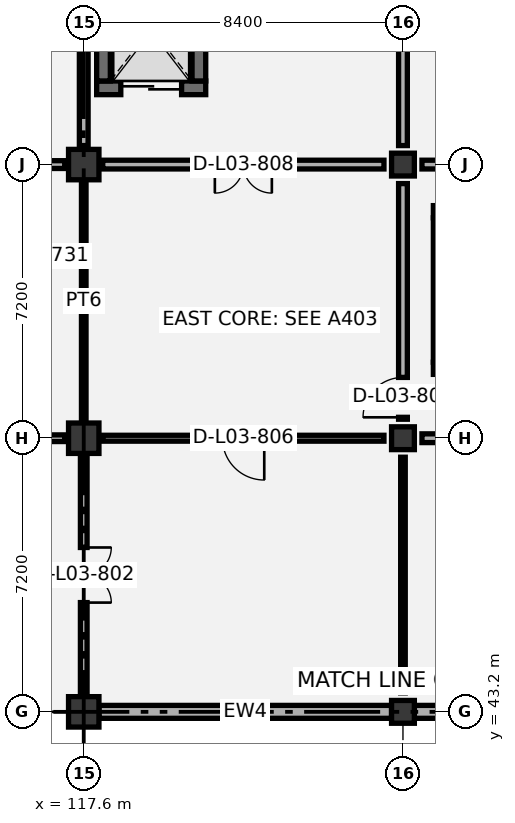
"""IFC4 building model, lengths in metres.
Left out: names, types, materials, properties, quantities, classifications, styles, units other than length and angle.
Written with IfcOpenShell. Run it as: python <this file> out.ifc"""

import sys

from ifc_helpers import new_model, si_unit, direction, frame, frame_2d, origin, origin_2d, place, context, subcontext, project, spatial, rectangle, extrude, element, fill, save


model = new_model("IFC4")
c1 = context("Model", 3, precision=1e-05, world=origin(), true_north=direction((0.0, 1.0)))
c2 = subcontext(c1, "Body", "Model", "MODEL_VIEW")
j1 = project(units=[si_unit("LENGTHUNIT", "METRE"), si_unit("PLANEANGLEUNIT", "RADIAN")], contexts=[c1])
p1 = place(None, origin())
s1 = spatial("IfcSite", under=j1, at=p1, CompositionType="ELEMENT")
p2 = place(p1, origin())
s2 = spatial("IfcBuilding", under=s1, at=p2, CompositionType="ELEMENT")
p3 = place(p2, frame((0.0, 0.0, 16.8)))
s3 = spatial("IfcBuildingStorey", under=s2, at=p3, CompositionType="ELEMENT", Elevation=16.8)
for number, where, z_axis, x_axis in (
    (1, (117.6, 43.2, 0.0), (0.0, 0.0, 1.0), (1.0, 0.0, 0.0)),
    (2, (117.6, 50.4, 0.0), (0.0, 0.0, 1.0), (1.0, 0.0, 0.0)),
    (3, (117.6, 57.6, 0.0), (0.0, 0.0, 1.0), (1.0, 0.0, 0.0)),
):
    element("IfcColumn", number, at=place(p3, frame(where, z_axis=z_axis, x_axis=x_axis)), inside=s3, PredefinedType="COLUMN", context=c2, shape_type="SweptSolid", body=[
        extrude(rectangle(XDim=0.8, YDim=0.8, at=origin_2d()), origin(), (0.0, 0.0, 1.0), 5.4),
    ])
for number, where, z_axis, x_axis in (
    (4, (126.0, 43.2, 0.0), (0.0, 0.0, 1.0), (1.0, 0.0, 0.0)),
    (5, (126.0, 50.4, 0.0), (0.0, 0.0, 1.0), (1.0, 0.0, 0.0)),
    (6, (126.0, 57.6, 0.0), (0.0, 0.0, 1.0), (1.0, 0.0, 0.0)),
):
    element("IfcColumn", number, at=place(p3, frame(where, z_axis=z_axis, x_axis=x_axis)), inside=s3, PredefinedType="COLUMN", context=c2, shape_type="SweptSolid", body=[
        extrude(rectangle(XDim=0.6, YDim=0.6, at=origin_2d()), origin(), (0.0, 0.0, 1.0), 5.4),
    ])
p4 = place(p3, frame((126.8, 52.24, 0.0), z_axis=(0.0, 0.0, 1.0), x_axis=(1.0, 0.0, 0.0)))
e7 = element("IfcWall", 7, at=p4, inside=s3, PredefinedType="SHEAR", context=c2, shape_type="SweptSolid", body=[
    extrude(rectangle(XDim=7.48, YDim=0.32, at=frame_2d((3.74, 0.0))), origin(), (0.0, 0.0, 1.0), 5.05),
])
p5 = place(p4, frame((0.45, 0.0, 0.0)))
e8 = element("IfcOpeningElement", 8, at=p5, cuts=e7, PredefinedType="OPENING", context=c2, shape_type="SweptSolid", body=[
    extrude(rectangle(XDim=1.05, YDim=2.15, at=frame_2d((0.525, 1.075))), frame((0.0, 0.17, 0.0), z_axis=(0.0, -1.0, 0.0), x_axis=(1.0, 0.0, 0.0)), (0.0, 0.0, 1.0), 0.34),
])
p6 = place(p3, frame((126.8, 56.36, 0.0), z_axis=(0.0, 0.0, 1.0), x_axis=(1.0, 0.0, 0.0)))
e9 = element("IfcWall", 9, at=p6, inside=s3, PredefinedType="SHEAR", context=c2, shape_type="SweptSolid", body=[
    extrude(rectangle(XDim=7.48, YDim=0.32, at=frame_2d((3.74, 0.0))), origin(), (0.0, 0.0, 1.0), 5.05),
])
p7 = place(p3, frame((126.96, 52.4, 0.0), z_axis=(0.0, 0.0, 1.0), x_axis=(0.0, 1.0, 0.0)))
e10 = element("IfcWall", 10, at=p7, inside=s3, PredefinedType="SHEAR", context=c2, shape_type="SweptSolid", body=[
    extrude(rectangle(XDim=3.8, YDim=0.32, at=frame_2d((1.9, 0.0))), origin(), (0.0, 0.0, 1.0), 5.05),
])
p8 = place(p3, frame((117.94, 59.62, 0.0), z_axis=(0.0, 0.0, 1.0), x_axis=(1.0, 0.0, 0.0)))
e11 = element("IfcWall", 11, at=p8, inside=s3, PredefinedType="SHEAR", context=c2, shape_type="SweptSolid", body=[
    extrude(rectangle(XDim=2.87, YDim=0.36, at=frame_2d((1.435, 0.0))), origin(), (0.0, 0.0, 1.0), 6.5),
])
p9 = place(p8, frame((0.635, 0.0, 0.0)))
e12 = element("IfcOpeningElement", 12, at=p9, cuts=e11, PredefinedType="OPENING", context=c2, shape_type="SweptSolid", body=[
    extrude(rectangle(XDim=1.6, YDim=2.25, at=frame_2d((0.8, 1.125))), frame((0.0, 0.19, 0.0), z_axis=(0.0, -1.0, 0.0), x_axis=(1.0, 0.0, 0.0)), (0.0, 0.0, 1.0), 0.38),
])
for number, where, z_axis, x_axis in (
    (13, (118.12, 59.8, 0.0), (0.0, 0.0, 1.0), (0.0, 1.0, 0.0)),
    (14, (120.63, 59.8, 0.0), (0.0, 0.0, 1.0), (0.0, 1.0, 0.0)),
):
    element("IfcWall", number, at=place(p3, frame(where, z_axis=z_axis, x_axis=x_axis)), inside=s3, PredefinedType="SHEAR", context=c2, shape_type="SweptSolid", body=[
        extrude(rectangle(XDim=2.8, YDim=0.36, at=frame_2d((1.4, 0.0))), origin(), (0.0, 0.0, 1.0), 6.5),
    ])
p10 = place(p3, frame((118.0, 43.2, 0.0), z_axis=(0.0, 0.0, 1.0), x_axis=(1.0, 0.0, 0.0)))
e15 = element("IfcWall", 15, at=p10, inside=s3, PredefinedType="SOLIDWALL", context=c2, shape_type="SweptSolid", body=[
    extrude(rectangle(XDim=7.7, YDim=0.34, at=frame_2d((3.85, 0.0))), origin(), (0.0, 0.0, 1.0), 4.395),
])
p11 = place(p3, frame((126.3, 43.2, 0.0), z_axis=(0.0, 0.0, 1.0), x_axis=(1.0, 0.0, 0.0)))
e16 = element("IfcWall", 16, at=p11, inside=s3, PredefinedType="SOLIDWALL", context=c2, shape_type="SweptSolid", body=[
    extrude(rectangle(XDim=7.8, YDim=0.34, at=frame_2d((3.9, 0.0))), origin(), (0.0, 0.0, 1.0), 4.395),
])
p12 = place(p3, frame((109.35, 55.2, 0.0), z_axis=(0.0, 0.0, 1.0), x_axis=(1.0, 0.0, 0.0)))
e17 = element("IfcWall", 17, at=p12, inside=s3, PredefinedType="PARTITIONING", context=c2, shape_type="SweptSolid", body=[
    extrude(rectangle(XDim=8.1, YDim=0.12, at=frame_2d((4.05, 0.0))), origin(), (0.0, 0.0, 1.0), 4.95),
])
p13 = place(p12, frame((1.08, 0.0, 0.0)))
e18 = element("IfcOpeningElement", 18, at=p13, cuts=e17, PredefinedType="OPENING", context=c2, shape_type="SweptSolid", body=[
    extrude(rectangle(XDim=0.95, YDim=2.1, at=frame_2d((0.475, 1.05))), frame((0.0, 0.07, 0.0), z_axis=(0.0, -1.0, 0.0), x_axis=(1.0, 0.0, 0.0)), (0.0, 0.0, 1.0), 0.14),
])
p14 = place(p12, frame((3.63, 0.0, 0.0)))
e19 = element("IfcOpeningElement", 19, at=p14, cuts=e17, PredefinedType="OPENING", context=c2, shape_type="SweptSolid", body=[
    extrude(rectangle(XDim=0.9, YDim=2.1, at=frame_2d((0.45, 1.05))), frame((0.0, 0.07, 0.0), z_axis=(0.0, -1.0, 0.0), x_axis=(1.0, 0.0, 0.0)), (0.0, 0.0, 1.0), 0.14),
])
p15 = place(p12, frame((6.13, 0.0, 0.0)))
e20 = element("IfcOpeningElement", 20, at=p15, cuts=e17, PredefinedType="OPENING", context=c2, shape_type="SweptSolid", body=[
    extrude(rectangle(XDim=1.0, YDim=2.1, at=frame_2d((0.5, 1.05))), frame((0.0, 0.07, 0.0), z_axis=(0.0, -1.0, 0.0), x_axis=(1.0, 0.0, 0.0)), (0.0, 0.0, 1.0), 0.14),
])
p16 = place(p3, frame((117.6, 43.7, 0.0), z_axis=(0.0, 0.0, 1.0), x_axis=(0.0, 1.0, 0.0)))
e21 = element("IfcWall", 21, at=p16, inside=s3, PredefinedType="PARTITIONING", context=c2, shape_type="SweptSolid", body=[
    extrude(rectangle(XDim=6.2, YDim=0.175, at=frame_2d((3.1, 0.0))), origin(), (0.0, 0.0, 1.0), 4.245),
])
p17 = place(p16, frame((2.375, 0.0, 0.0)))
e22 = element("IfcOpeningElement", 22, at=p17, cuts=e21, PredefinedType="OPENING", context=c2, shape_type="SweptSolid", body=[
    extrude(rectangle(XDim=1.45, YDim=2.2, at=frame_2d((0.725, 1.1))), frame((0.0, 0.097, 0.0), z_axis=(0.0, -1.0, 0.0), x_axis=(1.0, 0.0, 0.0)), (0.0, 0.0, 1.0), 0.195),
])
p18 = place(p3, frame((109.7, 50.4, 0.0), z_axis=(0.0, 0.0, 1.0), x_axis=(1.0, 0.0, 0.0)))
e23 = element("IfcWall", 23, at=p18, inside=s3, PredefinedType="PARTITIONING", context=c2, shape_type="SweptSolid", body=[
    extrude(rectangle(XDim=7.4, YDim=0.175, at=frame_2d((3.7, 0.0))), origin(), (0.0, 0.0, 1.0), 4.195),
])
p19 = place(p3, frame((117.6, 50.9, 0.0), z_axis=(0.0, 0.0, 1.0), x_axis=(0.0, 1.0, 0.0)))
e24 = element("IfcWall", 24, at=p19, inside=s3, PredefinedType="PARTITIONING", context=c2, shape_type="SweptSolid", body=[
    extrude(rectangle(XDim=6.2, YDim=0.12, at=frame_2d((3.1, 0.0))), origin(), (0.0, 0.0, 1.0), 4.545),
])
p20 = place(p3, frame((109.7, 57.6, 0.0), z_axis=(0.0, 0.0, 1.0), x_axis=(1.0, 0.0, 0.0)))
e25 = element("IfcWall", 25, at=p20, inside=s3, PredefinedType="PARTITIONING", context=c2, shape_type="SweptSolid", body=[
    extrude(rectangle(XDim=7.4, YDim=0.205, at=frame_2d((3.7, 0.0))), origin(), (0.0, 0.0, 1.0), 4.195),
])
p21 = place(p20, frame((3.025, 0.0, 0.0)))
e26 = element("IfcOpeningElement", 26, at=p21, cuts=e25, PredefinedType="OPENING", context=c2, shape_type="SweptSolid", body=[
    extrude(rectangle(XDim=1.35, YDim=2.15, at=frame_2d((0.675, 1.075))), frame((0.0, 0.113, 0.0), z_axis=(0.0, -1.0, 0.0), x_axis=(1.0, 0.0, 0.0)), (0.0, 0.0, 1.0), 0.225),
])
p22 = place(p3, frame((117.6, 58.1, 0.0), z_axis=(0.0, 0.0, 1.0), x_axis=(0.0, 1.0, 0.0)))
e27 = element("IfcWall", 27, at=p22, inside=s3, PredefinedType="PARTITIONING", context=c2, shape_type="SweptSolid", body=[
    extrude(rectangle(XDim=6.2, YDim=0.23, at=frame_2d((3.1, 0.0))), origin(), (0.0, 0.0, 1.0), 4.245),
])
p23 = place(p3, frame((126.0, 43.7, 0.0), z_axis=(0.0, 0.0, 1.0), x_axis=(0.0, 1.0, 0.0)))
e28 = element("IfcWall", 28, at=p23, inside=s3, PredefinedType="PARTITIONING", context=c2, shape_type="SweptSolid", body=[
    extrude(rectangle(XDim=6.2, YDim=0.12, at=frame_2d((3.1, 0.0))), origin(), (0.0, 0.0, 1.0), 4.645),
])
p24 = place(p3, frame((118.1, 50.4, 0.0), z_axis=(0.0, 0.0, 1.0), x_axis=(1.0, 0.0, 0.0)))
e29 = element("IfcWall", 29, at=p24, inside=s3, PredefinedType="PARTITIONING", context=c2, shape_type="SweptSolid", body=[
    extrude(rectangle(XDim=7.4, YDim=0.155, at=frame_2d((3.7, 0.0))), origin(), (0.0, 0.0, 1.0), 4.295),
])
p25 = place(p24, frame((3.15, 0.0, 0.0)))
e30 = element("IfcOpeningElement", 30, at=p25, cuts=e29, PredefinedType="OPENING", context=c2, shape_type="SweptSolid", body=[
    extrude(rectangle(XDim=1.1, YDim=2.1, at=frame_2d((0.55, 1.05))), frame((0.0, 0.087, 0.0), z_axis=(0.0, -1.0, 0.0), x_axis=(1.0, 0.0, 0.0)), (0.0, 0.0, 1.0), 0.175),
])
p26 = place(p3, frame((126.0, 50.9, 0.0), z_axis=(0.0, 0.0, 1.0), x_axis=(0.0, 1.0, 0.0)))
e31 = element("IfcWall", 31, at=p26, inside=s3, PredefinedType="PARTITIONING", context=c2, shape_type="SweptSolid", body=[
    extrude(rectangle(XDim=6.2, YDim=0.23, at=frame_2d((3.1, 0.0))), origin(), (0.0, 0.0, 1.0), 4.345),
])
p27 = place(p26, frame((0.05, 0.0, 0.0)))
e32 = element("IfcOpeningElement", 32, at=p27, cuts=e31, PredefinedType="OPENING", context=c2, shape_type="SweptSolid", body=[
    extrude(rectangle(XDim=1.05, YDim=2.15, at=frame_2d((0.525, 1.075))), frame((0.0, 0.125, 0.0), z_axis=(0.0, -1.0, 0.0), x_axis=(1.0, 0.0, 0.0)), (0.0, 0.0, 1.0), 0.25),
])
p28 = place(p3, frame((118.1, 57.6, 0.0), z_axis=(0.0, 0.0, 1.0), x_axis=(1.0, 0.0, 0.0)))
e33 = element("IfcWall", 33, at=p28, inside=s3, PredefinedType="PARTITIONING", context=c2, shape_type="SweptSolid", body=[
    extrude(rectangle(XDim=7.4, YDim=0.23, at=frame_2d((3.7, 0.0))), origin(), (0.0, 0.0, 1.0), 4.295),
])
p29 = place(p28, frame((2.95, 0.0, 0.0)))
e34 = element("IfcOpeningElement", 34, at=p29, cuts=e33, PredefinedType="OPENING", context=c2, shape_type="SweptSolid", body=[
    extrude(rectangle(XDim=1.5, YDim=2.15, at=frame_2d((0.75, 1.075))), frame((0.0, 0.125, 0.0), z_axis=(0.0, -1.0, 0.0), x_axis=(1.0, 0.0, 0.0)), (0.0, 0.0, 1.0), 0.25),
])
p30 = place(p3, frame((126.0, 58.1, 0.0), z_axis=(0.0, 0.0, 1.0), x_axis=(0.0, 1.0, 0.0)))
e35 = element("IfcWall", 35, at=p30, inside=s3, PredefinedType="PARTITIONING", context=c2, shape_type="SweptSolid", body=[
    extrude(rectangle(XDim=6.2, YDim=0.23, at=frame_2d((3.1, 0.0))), origin(), (0.0, 0.0, 1.0), 4.755),
])
p31 = place(p3, frame((126.5, 50.4, 0.0), z_axis=(0.0, 0.0, 1.0), x_axis=(1.0, 0.0, 0.0)))
e36 = element("IfcWall", 36, at=p31, inside=s3, PredefinedType="PARTITIONING", context=c2, shape_type="SweptSolid", body=[
    extrude(rectangle(XDim=7.4, YDim=0.23, at=frame_2d((3.7, 0.0))), origin(), (0.0, 0.0, 1.0), 4.295),
])
p32 = place(p31, frame((2.95, 0.0, 0.0)))
e37 = element("IfcOpeningElement", 37, at=p32, cuts=e36, PredefinedType="OPENING", context=c2, shape_type="SweptSolid", body=[
    extrude(rectangle(XDim=1.5, YDim=2.15, at=frame_2d((0.75, 1.075))), frame((0.0, 0.125, 0.0), z_axis=(0.0, -1.0, 0.0), x_axis=(1.0, 0.0, 0.0)), (0.0, 0.0, 1.0), 0.25),
])
p33 = place(p3, frame((126.5, 57.6, 0.0), z_axis=(0.0, 0.0, 1.0), x_axis=(1.0, 0.0, 0.0)))
e38 = element("IfcWall", 38, at=p33, inside=s3, PredefinedType="PARTITIONING", context=c2, shape_type="SweptSolid", body=[
    extrude(rectangle(XDim=7.4, YDim=0.23, at=frame_2d((3.7, 0.0))), origin(), (0.0, 0.0, 1.0), 4.295),
])
p34 = place(p9, origin())
e39 = element("IfcDoor", 39, at=p34, inside=s3, OperationType="DOUBLE_DOOR_SLIDING", PredefinedType="DOOR", context=c2, shape_type="SweptSolid", body=[
    extrude(rectangle(XDim=1.6, YDim=2.25, at=frame_2d((0.8, 1.125))), frame((0.0, 0.025, 0.0), z_axis=(0.0, -1.0, 0.0), x_axis=(1.0, 0.0, 0.0)), (0.0, 0.0, 1.0), 0.05),
])
fill(e12, e39)
p35 = place(p17, frame((1.45, 0.0, 0.0), z_axis=(0.0, 0.0, 1.0), x_axis=(-1.0, 0.0, 0.0)))
e40 = element("IfcDoor", 40, at=p35, inside=s3, OperationType="DOUBLE_DOOR_SINGLE_SWING", PredefinedType="DOOR", context=c2, shape_type="SweptSolid", body=[
    extrude(rectangle(XDim=1.45, YDim=2.2, at=frame_2d((0.725, 1.1))), frame((0.0, 0.025, 0.0), z_axis=(0.0, -1.0, 0.0), x_axis=(1.0, 0.0, 0.0)), (0.0, 0.0, 1.0), 0.05),
])
fill(e22, e40)
p36 = place(p25, frame((1.1, 0.0, 0.0), z_axis=(0.0, 0.0, 1.0), x_axis=(-1.0, 0.0, 0.0)))
e41 = element("IfcDoor", 41, at=p36, inside=s3, OperationType="SINGLE_SWING_LEFT", PredefinedType="DOOR", context=c2, shape_type="SweptSolid", body=[
    extrude(rectangle(XDim=1.1, YDim=2.1, at=frame_2d((0.55, 1.05))), frame((0.0, 0.025, 0.0), z_axis=(0.0, -1.0, 0.0), x_axis=(1.0, 0.0, 0.0)), (0.0, 0.0, 1.0), 0.05),
])
fill(e30, e41)
p37 = place(p27, origin())
e42 = element("IfcDoor", 42, at=p37, inside=s3, OperationType="SINGLE_SWING_LEFT", PredefinedType="DOOR", context=c2, shape_type="SweptSolid", body=[
    extrude(rectangle(XDim=1.05, YDim=2.15, at=frame_2d((0.525, 1.075))), frame((0.0, 0.025, 0.0), z_axis=(0.0, -1.0, 0.0), x_axis=(1.0, 0.0, 0.0)), (0.0, 0.0, 1.0), 0.05),
])
fill(e32, e42)
p38 = place(p29, frame((1.5, 0.0, 0.0), z_axis=(0.0, 0.0, 1.0), x_axis=(-1.0, 0.0, 0.0)))
e43 = element("IfcDoor", 43, at=p38, inside=s3, OperationType="DOUBLE_DOOR_SINGLE_SWING", PredefinedType="DOOR", context=c2, shape_type="SweptSolid", body=[
    extrude(rectangle(XDim=1.5, YDim=2.15, at=frame_2d((0.75, 1.075))), frame((0.0, 0.025, 0.0), z_axis=(0.0, -1.0, 0.0), x_axis=(1.0, 0.0, 0.0)), (0.0, 0.0, 1.0), 0.05),
])
fill(e34, e43)
save(model, sys.argv[1])
